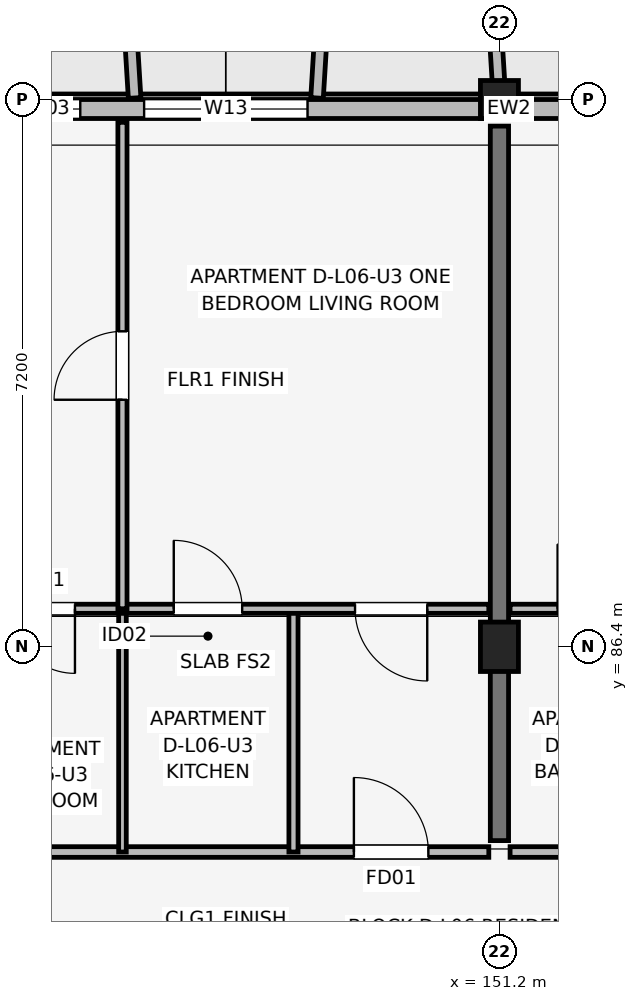
"""IFC4 building model, lengths in metres.
Left out: names, types, materials, properties, quantities, classifications, styles, units other than length and angle.
Written with IfcOpenShell. Run it as: python <this file> out.ifc"""

import sys

from ifc_helpers import new_model, si_unit, direction, frame, frame_2d, origin, origin_2d, place, context, subcontext, project, spatial, rectangle, extrude, element, fill, save


model = new_model("IFC4")
c1 = context("Model", 3, precision=1e-05, world=origin(), true_north=direction((0.0, 1.0)))
c2 = subcontext(c1, "Body", "Model", "MODEL_VIEW")
j1 = project(units=[si_unit("LENGTHUNIT", "METRE"), si_unit("PLANEANGLEUNIT", "RADIAN")], contexts=[c1])
p1 = place(None, origin())
s1 = spatial("IfcSite", under=j1, at=p1, CompositionType="ELEMENT")
p2 = place(p1, origin())
s2 = spatial("IfcBuilding", under=s1, at=p2, CompositionType="ELEMENT")
p3 = place(p2, frame((0.0, 0.0, 21.3)))
s3 = spatial("IfcBuildingStorey", under=s2, at=p3, CompositionType="ELEMENT", Elevation=21.3)
p4 = place(p3, frame((151.2, 86.4, 0.0), z_axis=(0.0, 0.0, 1.0), x_axis=(1.0, 0.0, 0.0)))
e1 = element("IfcColumn", 1, at=p4, inside=s3, PredefinedType="COLUMN", context=c2, shape_type="SweptSolid", body=[
    extrude(rectangle(XDim=0.5, YDim=0.65, at=origin_2d()), origin(), (0.0, 0.0, 1.0), 3.15),
])
p5 = place(p3, frame((151.2, 93.6, 0.0), z_axis=(0.0, 0.0, 1.0), x_axis=(1.0, 0.0, 0.0)))
e2 = element("IfcColumn", 2, at=p5, inside=s3, PredefinedType="COLUMN", context=c2, shape_type="SweptSolid", body=[
    extrude(rectangle(XDim=0.5, YDim=0.5, at=origin_2d()), origin(), (0.0, 0.0, 1.0), 3.15),
])
p6 = place(p3, frame((151.2, 83.85, 0.0), z_axis=(0.0, 0.0, 1.0), x_axis=(0.0, 1.0, 0.0)))
e3 = element("IfcWall", 3, at=p6, inside=s3, PredefinedType="SHEAR", context=c2, shape_type="SweptSolid", body=[
    extrude(rectangle(XDim=9.4, YDim=0.24, at=frame_2d((4.7, 0.0))), origin(), (0.0, 0.0, 1.0), 3.15),
])
p7 = place(p3, frame((162.8, 93.475, 0.0), z_axis=(0.0, 0.0, 1.0), x_axis=(-1.0, 0.0, 0.0)))
e4 = element("IfcWall", 4, at=p7, inside=s3, PredefinedType="SOLIDWALL", context=c2, shape_type="SweptSolid", body=[
    extrude(rectangle(XDim=30.4, YDim=0.25, at=frame_2d((15.2, 0.0))), origin(), (0.0, 0.0, 1.0), 2.43),
])
p8 = place(p7, frame((23.3, 0.0, 0.0), z_axis=(0.0, 0.0, 1.0), x_axis=(-1.0, 0.0, 0.0)))
e5 = element("IfcOpeningElement", 5, at=p8, cuts=e4, PredefinedType="OPENING", context=c2, shape_type="SweptSolid", body=[
    extrude(rectangle(XDim=1.8, YDim=2.15, at=frame_2d((0.9, 1.075))), frame((0.0, 0.135, 0.0), z_axis=(0.0, -1.0, 0.0), x_axis=(1.0, 0.0, 0.0)), (0.0, 0.0, 1.0), 0.27),
])
p9 = place(p7, frame((8.825, 0.0, 0.0), z_axis=(0.0, 0.0, 1.0), x_axis=(-1.0, 0.0, 0.0)))
e6 = element("IfcOpeningElement", 6, at=p9, cuts=e4, PredefinedType="OPENING", context=c2, shape_type="SweptSolid", body=[
    extrude(rectangle(XDim=1.65, YDim=2.15, at=frame_2d((0.825, 1.075))), frame((0.0, 0.135, 0.0), z_axis=(0.0, -1.0, 0.0), x_axis=(1.0, 0.0, 0.0)), (0.0, 0.0, 1.0), 0.27),
])
p10 = place(p7, frame((26.985, 0.0, 0.75)))
e7 = element("IfcOpeningElement", 7, at=p10, cuts=e4, PredefinedType="OPENING", context=c2, shape_type="SweptSolid", body=[
    extrude(rectangle(XDim=0.72, YDim=1.35, at=frame_2d((0.36, 0.675))), frame((0.0, 0.135, 0.0), z_axis=(0.0, -1.0, 0.0), x_axis=(1.0, 0.0, 0.0)), (0.0, 0.0, 1.0), 0.27),
])
p11 = place(p7, frame((17.115, 0.0, 0.75)))
e8 = element("IfcOpeningElement", 8, at=p11, cuts=e4, PredefinedType="OPENING", context=c2, shape_type="SweptSolid", body=[
    extrude(rectangle(XDim=0.85, YDim=1.4, at=frame_2d((0.425, 0.7))), frame((0.0, 0.135, 0.0), z_axis=(0.0, -1.0, 0.0), x_axis=(1.0, 0.0, 0.0)), (0.0, 0.0, 1.0), 0.27),
])
p12 = place(p7, frame((14.125, 0.0, 0.67)))
e9 = element("IfcOpeningElement", 9, at=p12, cuts=e4, PredefinedType="OPENING", context=c2, shape_type="SweptSolid", body=[
    extrude(rectangle(XDim=2.15, YDim=1.65, at=frame_2d((1.075, 0.825))), frame((0.0, 0.135, 0.0), z_axis=(0.0, -1.0, 0.0), x_axis=(1.0, 0.0, 0.0)), (0.0, 0.0, 1.0), 0.27),
])
p13 = place(p7, frame((2.125, 0.0, 0.7)))
e10 = element("IfcOpeningElement", 10, at=p13, cuts=e4, PredefinedType="OPENING", context=c2, shape_type="SweptSolid", body=[
    extrude(rectangle(XDim=1.86, YDim=1.6, at=frame_2d((0.93, 0.8))), frame((0.0, 0.135, 0.0), z_axis=(0.0, -1.0, 0.0), x_axis=(1.0, 0.0, 0.0)), (0.0, 0.0, 1.0), 0.27),
])
for number, where, z_axis, x_axis in (
    (11, (146.4, 93.62, 0.0), (0.0, 0.0, 1.0), (-0.061, 0.998, 0.0)),
    (12, (148.8, 93.62, 0.0), (0.0, 0.0, 1.0), (0.061, 0.998, 0.0)),
):
    element("IfcWall", number, at=place(p3, frame(where, z_axis=z_axis, x_axis=x_axis)), inside=s3, PredefinedType="ELEMENTEDWALL", context=c2, shape_type="SweptSolid", body=[
        extrude(rectangle(XDim=1.964, YDim=0.165, at=frame_2d((0.982, 0.0))), origin(), (0.0, 0.0, 1.0), 2.53),
    ])
p14 = place(p3, frame((151.2, 93.62, 0.0), z_axis=(0.0, 0.0, 1.0), x_axis=(-0.061046865508, 0.998134900808, 0.0)))
e13 = element("IfcWall", 13, at=p14, inside=s3, PredefinedType="ELEMENTEDWALL", context=c2, shape_type="SweptSolid", body=[
    extrude(rectangle(XDim=1.964, YDim=0.165, at=frame_2d((0.982, 0.0))), origin(), (0.0, 0.0, 1.0), 2.95),
])
p15 = place(p3, frame((144.14, 83.7, 0.0), z_axis=(0.0, 0.0, 1.0), x_axis=(1.0, 0.0, 0.0)))
e14 = element("IfcWall", 14, at=p15, inside=s3, PredefinedType="PARTITIONING", context=c2, shape_type="SweptSolid", body=[
    extrude(rectangle(XDim=6.92, YDim=0.14, at=frame_2d((3.46, 0.0))), origin(), (0.0, 0.0, 1.0), 2.38),
])
p16 = place(p15, frame((5.145, 0.0, 0.0)))
e15 = element("IfcOpeningElement", 15, at=p16, cuts=e14, PredefinedType="OPENING", context=c2, shape_type="SweptSolid", body=[
    extrude(rectangle(XDim=0.98, YDim=2.1, at=frame_2d((0.49, 1.05))), frame((0.0, 0.08, 0.0), z_axis=(0.0, -1.0, 0.0), x_axis=(1.0, 0.0, 0.0)), (0.0, 0.0, 1.0), 0.16),
])
p17 = place(p3, frame((146.24, 83.7, 0.0), z_axis=(0.0, 0.0, 1.0), x_axis=(0.0, 1.0, 0.0)))
e16 = element("IfcWall", 16, at=p17, inside=s3, PredefinedType="PARTITIONING", context=c2, shape_type="SweptSolid", body=[
    extrude(rectangle(XDim=3.2, YDim=0.1, at=frame_2d((1.6, 0.0))), origin(), (0.0, 0.0, 1.0), 2.38),
])
p18 = place(p3, frame((148.49, 83.7, 0.0), z_axis=(0.0, 0.0, 1.0), x_axis=(0.0, 1.0, 0.0)))
e17 = element("IfcWall", 17, at=p18, inside=s3, PredefinedType="PARTITIONING", context=c2, shape_type="SweptSolid", body=[
    extrude(rectangle(XDim=3.2, YDim=0.12, at=frame_2d((1.6, 0.0))), origin(), (0.0, 0.0, 1.0), 2.38),
])
p19 = place(p3, frame((144.14, 86.9, 0.0), z_axis=(0.0, 0.0, 1.0), x_axis=(1.0, 0.0, 0.0)))
e18 = element("IfcWall", 18, at=p19, inside=s3, PredefinedType="PARTITIONING", context=c2, shape_type="SweptSolid", body=[
    extrude(rectangle(XDim=6.92, YDim=0.12, at=frame_2d((3.46, 0.0))), origin(), (0.0, 0.0, 1.0), 2.38),
])
p20 = place(p19, frame((1.475, 0.0, 0.0), z_axis=(0.0, 0.0, 1.0), x_axis=(-1.0, 0.0, 0.0)))
e19 = element("IfcOpeningElement", 19, at=p20, cuts=e18, PredefinedType="OPENING", context=c2, shape_type="SweptSolid", body=[
    extrude(rectangle(XDim=0.85, YDim=2.08, at=frame_2d((0.425, 1.04))), frame((0.0, 0.07, 0.0), z_axis=(0.0, -1.0, 0.0), x_axis=(1.0, 0.0, 0.0)), (0.0, 0.0, 1.0), 0.14),
])
p21 = place(p19, frame((2.775, 0.0, 0.0)))
e20 = element("IfcOpeningElement", 20, at=p21, cuts=e18, PredefinedType="OPENING", context=c2, shape_type="SweptSolid", body=[
    extrude(rectangle(XDim=0.9, YDim=2.08, at=frame_2d((0.45, 1.04))), frame((0.0, 0.07, 0.0), z_axis=(0.0, -1.0, 0.0), x_axis=(1.0, 0.0, 0.0)), (0.0, 0.0, 1.0), 0.14),
])
p22 = place(p19, frame((6.11, 0.0, 0.0), z_axis=(0.0, 0.0, 1.0), x_axis=(-1.0, 0.0, 0.0)))
e21 = element("IfcOpeningElement", 21, at=p22, cuts=e18, PredefinedType="OPENING", context=c2, shape_type="SweptSolid", body=[
    extrude(rectangle(XDim=0.95, YDim=2.08, at=frame_2d((0.475, 1.04))), frame((0.0, 0.07, 0.0), z_axis=(0.0, -1.0, 0.0), x_axis=(1.0, 0.0, 0.0)), (0.0, 0.0, 1.0), 0.14),
])
p23 = place(p3, frame((146.24, 86.9, 0.0), z_axis=(0.0, 0.0, 1.0), x_axis=(0.0, 1.0, 0.0)))
e22 = element("IfcWall", 22, at=p23, inside=s3, PredefinedType="PARTITIONING", context=c2, shape_type="SweptSolid", body=[
    extrude(rectangle(XDim=6.4, YDim=0.12, at=frame_2d((3.2, 0.0))), origin(), (0.0, 0.0, 1.0), 2.38),
])
p24 = place(p23, frame((2.75, 0.0, 0.0)))
e23 = element("IfcOpeningElement", 23, at=p24, cuts=e22, PredefinedType="OPENING", context=c2, shape_type="SweptSolid", body=[
    extrude(rectangle(XDim=0.9, YDim=2.08, at=frame_2d((0.45, 1.04))), frame((0.0, 0.07, 0.0), z_axis=(0.0, -1.0, 0.0), x_axis=(1.0, 0.0, 0.0)), (0.0, 0.0, 1.0), 0.14),
])
p25 = place(p3, frame((151.34, 83.7, 0.0), z_axis=(0.0, 0.0, 1.0), x_axis=(1.0, 0.0, 0.0)))
e24 = element("IfcWall", 24, at=p25, inside=s3, PredefinedType="PARTITIONING", context=c2, shape_type="SweptSolid", body=[
    extrude(rectangle(XDim=6.92, YDim=0.14, at=frame_2d((3.46, 0.0))), origin(), (0.0, 0.0, 1.0), 2.38),
])
p26 = place(p25, frame((5.975, 0.0, 0.0), z_axis=(0.0, 0.0, 1.0), x_axis=(-1.0, 0.0, 0.0)))
e25 = element("IfcOpeningElement", 25, at=p26, cuts=e24, PredefinedType="OPENING", context=c2, shape_type="SweptSolid", body=[
    extrude(rectangle(XDim=0.98, YDim=2.1, at=frame_2d((0.49, 1.05))), frame((0.0, 0.08, 0.0), z_axis=(0.0, -1.0, 0.0), x_axis=(1.0, 0.0, 0.0)), (0.0, 0.0, 1.0), 0.16),
])
p27 = place(p3, frame((151.34, 86.9, 0.0), z_axis=(0.0, 0.0, 1.0), x_axis=(1.0, 0.0, 0.0)))
e26 = element("IfcWall", 26, at=p27, inside=s3, PredefinedType="PARTITIONING", context=c2, shape_type="SweptSolid", body=[
    extrude(rectangle(XDim=6.92, YDim=0.12, at=frame_2d((3.46, 0.0))), origin(), (0.0, 0.0, 1.0), 2.38),
])
p28 = place(p27, frame((0.625, 0.0, 0.0)))
e27 = element("IfcOpeningElement", 27, at=p28, cuts=e26, PredefinedType="OPENING", context=c2, shape_type="SweptSolid", body=[
    extrude(rectangle(XDim=0.85, YDim=2.08, at=frame_2d((0.425, 1.04))), frame((0.0, 0.07, 0.0), z_axis=(0.0, -1.0, 0.0), x_axis=(1.0, 0.0, 0.0)), (0.0, 0.0, 1.0), 0.14),
])
p29 = place(p27, frame((3.525, 0.0, 0.0), z_axis=(0.0, 0.0, 1.0), x_axis=(-1.0, 0.0, 0.0)))
e28 = element("IfcOpeningElement", 28, at=p29, cuts=e26, PredefinedType="OPENING", context=c2, shape_type="SweptSolid", body=[
    extrude(rectangle(XDim=0.9, YDim=2.08, at=frame_2d((0.45, 1.04))), frame((0.0, 0.07, 0.0), z_axis=(0.0, -1.0, 0.0), x_axis=(1.0, 0.0, 0.0)), (0.0, 0.0, 1.0), 0.14),
])
p30 = place(p27, frame((5.01, 0.0, 0.0)))
e29 = element("IfcOpeningElement", 29, at=p30, cuts=e26, PredefinedType="OPENING", context=c2, shape_type="SweptSolid", body=[
    extrude(rectangle(XDim=0.95, YDim=2.08, at=frame_2d((0.475, 1.04))), frame((0.0, 0.07, 0.0), z_axis=(0.0, -1.0, 0.0), x_axis=(1.0, 0.0, 0.0)), (0.0, 0.0, 1.0), 0.14),
])
p31 = place(p11, origin())
e30 = element("IfcWindow", 30, at=p31, inside=s3, PartitioningType="SINGLE_PANEL", PredefinedType="WINDOW", context=c2, shape_type="SweptSolid", body=[
    extrude(rectangle(XDim=0.85, YDim=1.4, at=frame_2d((0.425, 0.7))), frame((0.0, 0.03, 0.0), z_axis=(0.0, -1.0, 0.0), x_axis=(1.0, 0.0, 0.0)), (0.0, 0.0, 1.0), 0.06),
])
fill(e8, e30)
p32 = place(p12, origin())
e31 = element("IfcWindow", 31, at=p32, inside=s3, PartitioningType="SINGLE_PANEL", PredefinedType="WINDOW", context=c2, shape_type="SweptSolid", body=[
    extrude(rectangle(XDim=2.15, YDim=1.65, at=frame_2d((1.075, 0.825))), frame((0.0, 0.03, 0.0), z_axis=(0.0, -1.0, 0.0), x_axis=(1.0, 0.0, 0.0)), (0.0, 0.0, 1.0), 0.06),
])
fill(e9, e31)
p33 = place(p16, origin())
e32 = element("IfcDoor", 32, at=p33, inside=s3, OperationType="SINGLE_SWING_LEFT", PredefinedType="DOOR", context=c2, shape_type="SweptSolid", body=[
    extrude(rectangle(XDim=0.98, YDim=2.1, at=frame_2d((0.49, 1.05))), frame((0.0, 0.025, 0.0), z_axis=(0.0, -1.0, 0.0), x_axis=(1.0, 0.0, 0.0)), (0.0, 0.0, 1.0), 0.05),
])
fill(e15, e32)
p34 = place(p20, origin())
e33 = element("IfcDoor", 33, at=p34, inside=s3, OperationType="SINGLE_SWING_RIGHT", PredefinedType="DOOR", context=c2, shape_type="SweptSolid", body=[
    extrude(rectangle(XDim=0.85, YDim=2.08, at=frame_2d((0.425, 1.04))), frame((0.0, 0.025, 0.0), z_axis=(0.0, -1.0, 0.0), x_axis=(1.0, 0.0, 0.0)), (0.0, 0.0, 1.0), 0.05),
])
fill(e19, e33)
p35 = place(p21, origin())
e34 = element("IfcDoor", 34, at=p35, inside=s3, OperationType="SINGLE_SWING_LEFT", PredefinedType="DOOR", context=c2, shape_type="SweptSolid", body=[
    extrude(rectangle(XDim=0.9, YDim=2.08, at=frame_2d((0.45, 1.04))), frame((0.0, 0.025, 0.0), z_axis=(0.0, -1.0, 0.0), x_axis=(1.0, 0.0, 0.0)), (0.0, 0.0, 1.0), 0.05),
])
fill(e20, e34)
p36 = place(p22, origin())
e35 = element("IfcDoor", 35, at=p36, inside=s3, OperationType="SINGLE_SWING_RIGHT", PredefinedType="DOOR", context=c2, shape_type="SweptSolid", body=[
    extrude(rectangle(XDim=0.95, YDim=2.08, at=frame_2d((0.475, 1.04))), frame((0.0, 0.025, 0.0), z_axis=(0.0, -1.0, 0.0), x_axis=(1.0, 0.0, 0.0)), (0.0, 0.0, 1.0), 0.05),
])
fill(e21, e35)
p37 = place(p24, origin())
e36 = element("IfcDoor", 36, at=p37, inside=s3, OperationType="SINGLE_SWING_LEFT", PredefinedType="DOOR", context=c2, shape_type="SweptSolid", body=[
    extrude(rectangle(XDim=0.9, YDim=2.08, at=frame_2d((0.45, 1.04))), frame((0.0, 0.025, 0.0), z_axis=(0.0, -1.0, 0.0), x_axis=(1.0, 0.0, 0.0)), (0.0, 0.0, 1.0), 0.05),
])
fill(e23, e36)
p38 = place(p28, origin())
e37 = element("IfcDoor", 37, at=p38, inside=s3, OperationType="SINGLE_SWING_LEFT", PredefinedType="DOOR", context=c2, shape_type="SweptSolid", body=[
    extrude(rectangle(XDim=0.85, YDim=2.08, at=frame_2d((0.425, 1.04))), frame((0.0, 0.025, 0.0), z_axis=(0.0, -1.0, 0.0), x_axis=(1.0, 0.0, 0.0)), (0.0, 0.0, 1.0), 0.05),
])
fill(e27, e37)
save(model, sys.argv[1])
